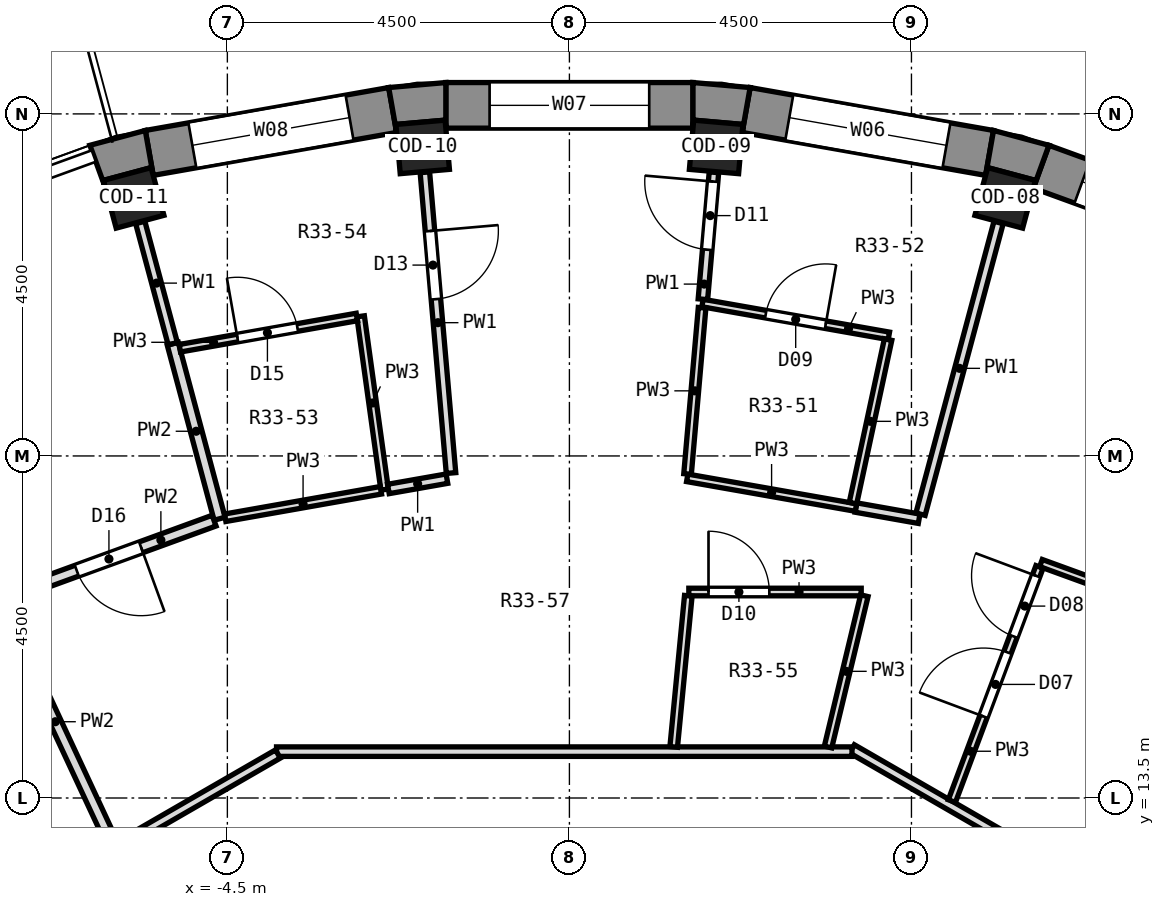
"""IFC4 building model, lengths in metres.
Left out: names, types, materials, properties, quantities, classifications, styles, units other than length and angle.
Written with IfcOpenShell. Run it as: python <this file> out.ifc"""

import sys

from ifc_helpers import new_model, si_unit, direction, frame, frame_2d, origin, origin_2d, place, context, subcontext, project, spatial, polyline, rectangle, outline, extrude, element, fill, save


model = new_model("IFC4")
c1 = context("Model", 3, precision=1e-05, world=origin(), true_north=direction((0.0, 1.0)))
c2 = subcontext(c1, "Body", "Model", "MODEL_VIEW")
j1 = project(units=[si_unit("LENGTHUNIT", "METRE"), si_unit("PLANEANGLEUNIT", "RADIAN")], contexts=[c1])
p1 = place(None, origin())
s1 = spatial("IfcSite", under=j1, at=p1, CompositionType="ELEMENT")
p2 = place(p1, origin())
s2 = spatial("IfcBuilding", under=s1, at=p2, CompositionType="ELEMENT")
p3 = place(p2, frame((0.0, 0.0, 229.7)))
s3 = spatial("IfcBuildingStorey", under=s2, at=p3, CompositionType="ELEMENT", Elevation=229.7)
for number, where, z_axis, x_axis in (
    (1, (5.733, 21.395, 0.0), (0.0, 0.0, 1.0), (0.259, 0.966, 0.0)),
    (2, (1.93, 22.066, 0.0), (0.0, 0.0, 1.0), (0.087, 0.996, 0.0)),
    (3, (-1.93, 22.066, 0.0), (0.0, 0.0, 1.0), (-0.087, 0.996, 0.0)),
    (4, (-5.733, 21.395, 0.0), (0.0, 0.0, 1.0), (-0.259, 0.966, 0.0)),
):
    element("IfcColumn", number, at=place(p3, frame(where, z_axis=z_axis, x_axis=x_axis)), inside=s3, PredefinedType="COLUMN", context=c2, shape_type="SweptSolid", body=[
        extrude(rectangle(XDim=0.65, YDim=0.65, at=origin_2d()), origin(), (0.0, 0.0, 1.0), 3.3),
    ])
p4 = place(p3, frame((9.262, 20.693, 0.0), z_axis=(0.0, 0.0, 1.0), x_axis=(-0.939679383794, 0.342056509473, 0.0)))
e5 = element("IfcWall", 5, at=p4, inside=s3, PredefinedType="SOLIDWALL", context=c2, shape_type="SweptSolid", body=[
    extrude(rectangle(XDim=3.252, YDim=0.6, at=frame_2d((1.626, 0.0))), origin(), (0.0, 0.0, 1.0), 2.9),
])
p5 = place(p4, frame((0.576, 0.0, 0.9)))
e6 = element("IfcOpeningElement", 6, at=p5, cuts=e5, PredefinedType="OPENING", context=c2, shape_type="SweptSolid", body=[
    extrude(rectangle(XDim=2.1, YDim=1.8, at=frame_2d((1.05, 0.9))), frame((0.0, 0.312, 0.0), z_axis=(0.0, -1.0, 0.0), x_axis=(1.0, 0.0, 0.0)), (0.0, 0.0, 1.0), 0.624),
])
p6 = place(p3, frame((5.528, 21.987, 0.0), z_axis=(0.0, 0.0, 1.0), x_axis=(-0.984806225186, 0.173656842178, 0.0)))
e7 = element("IfcWall", 7, at=p6, inside=s3, PredefinedType="SOLIDWALL", context=c2, shape_type="SweptSolid", body=[
    extrude(rectangle(XDim=3.252, YDim=0.6, at=frame_2d((1.626, 0.0))), origin(), (0.0, 0.0, 1.0), 2.9),
])
p7 = place(p6, frame((0.576, 0.0, 0.9)))
e8 = element("IfcOpeningElement", 8, at=p7, cuts=e7, PredefinedType="OPENING", context=c2, shape_type="SweptSolid", body=[
    extrude(rectangle(XDim=2.1, YDim=1.8, at=frame_2d((1.05, 0.9))), frame((0.0, 0.312, 0.0), z_axis=(0.0, -1.0, 0.0), x_axis=(1.0, 0.0, 0.0)), (0.0, 0.0, 1.0), 0.624),
])
p8 = place(p3, frame((1.626, 22.613, 0.0), z_axis=(0.0, 0.0, 1.0), x_axis=(-1.0, 0.0, 0.0)))
e9 = element("IfcWall", 9, at=p8, inside=s3, PredefinedType="SOLIDWALL", context=c2, shape_type="SweptSolid", body=[
    extrude(rectangle(XDim=3.251, YDim=0.6, at=frame_2d((1.626, 0.0))), origin(), (0.0, 0.0, 1.0), 2.9),
])
p9 = place(p8, frame((0.576, 0.0, 0.9)))
e10 = element("IfcOpeningElement", 10, at=p9, cuts=e9, PredefinedType="OPENING", context=c2, shape_type="SweptSolid", body=[
    extrude(rectangle(XDim=2.1, YDim=1.8, at=frame_2d((1.05, 0.9))), frame((0.0, 0.312, 0.0), z_axis=(0.0, -1.0, 0.0), x_axis=(1.0, 0.0, 0.0)), (0.0, 0.0, 1.0), 0.624),
])
p10 = place(p3, frame((-2.325, 22.551, 0.0), z_axis=(0.0, 0.0, 1.0), x_axis=(-0.984806225186, -0.173656842178, 0.0)))
e11 = element("IfcWall", 11, at=p10, inside=s3, PredefinedType="SOLIDWALL", context=c2, shape_type="SweptSolid", body=[
    extrude(rectangle(XDim=3.252, YDim=0.6, at=frame_2d((1.626, 0.0))), origin(), (0.0, 0.0, 1.0), 2.9),
])
p11 = place(p10, frame((0.576, 0.0, 0.9)))
e12 = element("IfcOpeningElement", 12, at=p11, cuts=e11, PredefinedType="OPENING", context=c2, shape_type="SweptSolid", body=[
    extrude(rectangle(XDim=2.1, YDim=1.8, at=frame_2d((1.05, 0.9))), frame((0.0, 0.312, 0.0), z_axis=(0.0, -1.0, 0.0), x_axis=(1.0, 0.0, 0.0)), (0.0, 0.0, 1.0), 0.624),
])
p12 = place(p3, origin())
e13 = element("IfcWall", 13, at=p12, inside=s3, PredefinedType="SOLIDWALL", context=c2, shape_type="SweptSolid", body=[
    extrude(outline(polyline([(5.58, 22.282), (5.476, 21.691), (5.503, 21.793), (6.131, 21.625), (6.104, 21.523), (6.309, 22.087), (5.58, 22.282)])), origin(), (0.0, 0.0, 1.0), 2.9),
])
p13 = place(p3, origin())
e14 = element("IfcWall", 14, at=p13, inside=s3, PredefinedType="SOLIDWALL", context=c2, shape_type="SweptSolid", body=[
    extrude(outline(polyline([(2.378, 22.847), (1.626, 22.913), (1.626, 22.312), (1.635, 22.418), (2.283, 22.361), (2.273, 22.256), (2.378, 22.847)])), origin(), (0.0, 0.0, 1.0), 2.9),
])
p14 = place(p3, origin())
e15 = element("IfcWall", 15, at=p14, inside=s3, PredefinedType="SOLIDWALL", context=c2, shape_type="SweptSolid", body=[
    extrude(outline(polyline([(-1.626, 22.913), (-2.378, 22.847), (-2.273, 22.256), (-2.283, 22.361), (-1.635, 22.418), (-1.626, 22.312), (-1.626, 22.913)])), origin(), (0.0, 0.0, 1.0), 2.9),
])
p15 = place(p3, origin())
e16 = element("IfcWall", 16, at=p15, inside=s3, PredefinedType="SOLIDWALL", context=c2, shape_type="SweptSolid", body=[
    extrude(outline(polyline([(-6.309, 22.087), (-6.104, 21.523), (-6.131, 21.625), (-5.503, 21.793), (-5.476, 21.691), (-5.58, 22.282), (-6.309, 22.087)])), origin(), (0.0, 0.0, 1.0), 2.9),
])
p16 = place(p3, frame((-1.902, 21.732, 0.0), z_axis=(0.0, 0.0, 1.0), x_axis=(0.086672056797, -0.996236896813, 0.0)))
e17 = element("IfcWall", 17, at=p16, inside=s3, PredefinedType="PARTITIONING", context=c2, shape_type="SweptSolid", body=[
    extrude(rectangle(XDim=3.972, YDim=0.125, at=frame_2d((1.986, 0.0))), origin(), (0.0, 0.0, 1.0), 2.9),
])
p17 = place(p16, frame((0.775, 0.0, 0.0)))
e18 = element("IfcOpeningElement", 18, at=p17, cuts=e17, PredefinedType="OPENING", context=c2, shape_type="SweptSolid", body=[
    extrude(rectangle(XDim=0.9, YDim=2.1, at=frame_2d((0.45, 1.05))), frame((0.0, 0.074, 0.0), z_axis=(0.0, -1.0, 0.0), x_axis=(1.0, 0.0, 0.0)), (0.0, 0.0, 1.0), 0.149),
])
p18 = place(p3, frame((-2.747, 19.837, 0.0), z_axis=(0.0, 0.0, 1.0), x_axis=(0.137351585164, -0.990522358179, 0.0)))
e19 = element("IfcWall", 19, at=p18, inside=s3, PredefinedType="PARTITIONING", context=c2, shape_type="SweptSolid", body=[
    extrude(rectangle(XDim=2.302, YDim=0.1, at=frame_2d((1.151, 0.0))), origin(), (0.0, 0.0, 1.0), 2.9),
])
p19 = place(p3, frame((-5.219, 19.477, 0.0), z_axis=(0.0, 0.0, 1.0), x_axis=(0.258503998493, -0.966010187712, 0.0)))
e20 = element("IfcWall", 20, at=p19, inside=s3, PredefinedType="PARTITIONING", context=c2, shape_type="SweptSolid", body=[
    extrude(rectangle(XDim=2.384, YDim=0.15, at=frame_2d((1.192, 0.0))), origin(), (0.0, 0.0, 1.0), 2.9),
])
p20 = place(p3, frame((-5.646, 21.072, 0.0), z_axis=(0.0, 0.0, 1.0), x_axis=(0.258849385643, -0.965917696055, 0.0)))
e21 = element("IfcWall", 21, at=p20, inside=s3, PredefinedType="PARTITIONING", context=c2, shape_type="SweptSolid", body=[
    extrude(rectangle(XDim=1.652, YDim=0.125, at=frame_2d((0.826, 0.0))), origin(), (0.0, 0.0, 1.0), 2.9),
])
p21 = place(p3, frame((-7.513, 16.112, 0.0), z_axis=(0.0, 0.0, 1.0), x_axis=(0.42248263036, -0.906371020634, 0.0)))
e22 = element("IfcWall", 22, at=p21, inside=s3, PredefinedType="PARTITIONING", context=c2, shape_type="SweptSolid", body=[
    extrude(rectangle(XDim=3.551, YDim=0.15, at=frame_2d((1.775, 0.0))), origin(), (0.0, 0.0, 1.0), 2.9),
])
p22 = place(p3, frame((3.718, 14.147, 0.0), z_axis=(0.0, 0.0, 1.0), x_axis=(0.866000791713, -0.500042626935, 0.0)))
e23 = element("IfcWall", 23, at=p22, inside=s3, PredefinedType="PARTITIONING", context=c2, shape_type="SweptSolid", body=[
    extrude(rectangle(XDim=7.635, YDim=0.125, at=frame_2d((3.817, 0.0))), origin(), (0.0, 0.0, 1.0), 2.9),
])
p23 = place(p22, frame((4.064, 0.0, 0.0)))
e24 = element("IfcOpeningElement", 24, at=p23, cuts=e23, PredefinedType="OPENING", context=c2, shape_type="SweptSolid", body=[
    extrude(rectangle(XDim=1.0, YDim=2.1, at=frame_2d((0.5, 1.05))), frame((0.0, 0.074, 0.0), z_axis=(0.0, -1.0, 0.0), x_axis=(1.0, 0.0, 0.0)), (0.0, 0.0, 1.0), 0.149),
])
p24 = place(p3, frame((6.204, 16.591, 0.0), z_axis=(0.0, 0.0, 1.0), x_axis=(0.939623600186, -0.342209716364, 0.0)))
e25 = element("IfcWall", 25, at=p24, inside=s3, PredefinedType="PARTITIONING", context=c2, shape_type="SweptSolid", body=[
    extrude(rectangle(XDim=1.344, YDim=0.1, at=frame_2d((0.672, 0.0))), origin(), (0.0, 0.0, 1.0), 2.9),
])
p25 = place(p3, frame((3.769, 17.321, 0.0), z_axis=(0.0, 0.0, 1.0), x_axis=(0.984637698915, -0.174609856179, 0.0)))
e26 = element("IfcWall", 26, at=p25, inside=s3, PredefinedType="PARTITIONING", context=c2, shape_type="SweptSolid", body=[
    extrude(rectangle(XDim=0.844, YDim=0.125, at=frame_2d((0.422, 0.0))), origin(), (0.0, 0.0, 1.0), 2.9),
])
p26 = place(p3, frame((1.55, 17.712, 0.0), z_axis=(0.0, 0.0, 1.0), x_axis=(0.984859814572, -0.173352662631, 0.0)))
e27 = element("IfcWall", 27, at=p26, inside=s3, PredefinedType="PARTITIONING", context=c2, shape_type="SweptSolid", body=[
    extrude(rectangle(XDim=2.253, YDim=0.1, at=frame_2d((1.127, 0.0))), origin(), (0.0, 0.0, 1.0), 2.9),
])
p27 = place(p3, frame((1.751, 20.012, 0.0), z_axis=(0.0, 0.0, 1.0), x_axis=(0.984838792384, -0.173472052547, 0.0)))
e28 = element("IfcWall", 28, at=p27, inside=s3, PredefinedType="PARTITIONING", context=c2, shape_type="SweptSolid", body=[
    extrude(rectangle(XDim=2.49, YDim=0.1, at=frame_2d((1.245, 0.0))), origin(), (0.0, 0.0, 1.0), 2.9),
])
p28 = place(p27, frame((0.845, 0.0, 0.0)))
e29 = element("IfcOpeningElement", 29, at=p28, cuts=e28, PredefinedType="OPENING", context=c2, shape_type="SweptSolid", body=[
    extrude(rectangle(XDim=0.8, YDim=2.1, at=frame_2d((0.4, 1.05))), frame((0.0, 0.062, 0.0), z_axis=(0.0, -1.0, 0.0), x_axis=(1.0, 0.0, 0.0)), (0.0, 0.0, 1.0), 0.124),
])
p29 = place(p3, frame((-3.853, 14.11, 0.0), z_axis=(0.0, 0.0, 1.0), x_axis=(1.0, 0.0, 0.0)))
e30 = element("IfcWall", 30, at=p29, inside=s3, PredefinedType="PARTITIONING", context=c2, shape_type="SweptSolid", body=[
    extrude(rectangle(XDim=7.571, YDim=0.125, at=frame_2d((3.785, 0.0))), origin(), (0.0, 0.0, 1.0), 2.9),
])
p30 = place(p3, frame((1.571, 16.21, 0.0), z_axis=(0.0, 0.0, 1.0), x_axis=(1.0, 0.0, 0.0)))
e31 = element("IfcWall", 31, at=p30, inside=s3, PredefinedType="PARTITIONING", context=c2, shape_type="SweptSolid", body=[
    extrude(rectangle(XDim=2.268, YDim=0.1, at=frame_2d((1.134, 0.0))), origin(), (0.0, 0.0, 1.0), 2.9),
])
p31 = place(p30, frame((0.259, 0.0, 0.0)))
e32 = element("IfcOpeningElement", 32, at=p31, cuts=e31, PredefinedType="OPENING", context=c2, shape_type="SweptSolid", body=[
    extrude(rectangle(XDim=0.8, YDim=2.1, at=frame_2d((0.4, 1.05))), frame((0.0, 0.062, 0.0), z_axis=(0.0, -1.0, 0.0), x_axis=(1.0, 0.0, 0.0)), (0.0, 0.0, 1.0), 0.124),
])
p32 = place(p3, frame((-4.528, 17.187, 0.0), z_axis=(0.0, 0.0, 1.0), x_axis=(0.984788286148, 0.173758543574, 0.0)))
e33 = element("IfcWall", 33, at=p32, inside=s3, PredefinedType="PARTITIONING", context=c2, shape_type="SweptSolid", body=[
    extrude(rectangle(XDim=2.08, YDim=0.1, at=frame_2d((1.04, 0.0))), origin(), (0.0, 0.0, 1.0), 2.9),
])
p33 = place(p3, frame((-2.382, 17.566, 0.0), z_axis=(0.0, 0.0, 1.0), x_axis=(0.984877691651, 0.173251067786, 0.0)))
e34 = element("IfcWall", 34, at=p33, inside=s3, PredefinedType="PARTITIONING", context=c2, shape_type="SweptSolid", body=[
    extrude(rectangle(XDim=0.782, YDim=0.125, at=frame_2d((0.391, 0.0))), origin(), (0.0, 0.0, 1.0), 2.9),
])
p34 = place(p3, frame((-5.125, 19.417, 0.0), z_axis=(0.0, 0.0, 1.0), x_axis=(0.984757568604, 0.173932547494, 0.0)))
e35 = element("IfcWall", 35, at=p34, inside=s3, PredefinedType="PARTITIONING", context=c2, shape_type="SweptSolid", body=[
    extrude(rectangle(XDim=2.365, YDim=0.1, at=frame_2d((1.183, 0.0))), origin(), (0.0, 0.0, 1.0), 2.9),
])
p35 = place(p34, frame((0.77, 0.0, 0.0)))
e36 = element("IfcOpeningElement", 36, at=p35, cuts=e35, PredefinedType="OPENING", context=c2, shape_type="SweptSolid", body=[
    extrude(rectangle(XDim=0.8, YDim=2.1, at=frame_2d((0.4, 1.05))), frame((0.0, 0.062, 0.0), z_axis=(0.0, -1.0, 0.0), x_axis=(1.0, 0.0, 0.0)), (0.0, 0.0, 1.0), 0.124),
])
p36 = place(p3, frame((-7.442, 16.14, 0.0), z_axis=(0.0, 0.0, 1.0), x_axis=(0.939459000347, 0.342661329401, 0.0)))
e37 = element("IfcWall", 37, at=p36, inside=s3, PredefinedType="PARTITIONING", context=c2, shape_type="SweptSolid", body=[
    extrude(rectangle(XDim=2.945, YDim=0.15, at=frame_2d((1.473, 0.0))), origin(), (0.0, 0.0, 1.0), 2.9),
])
p37 = place(p36, frame((1.023, 0.0, 0.0)))
e38 = element("IfcOpeningElement", 38, at=p37, cuts=e37, PredefinedType="OPENING", context=c2, shape_type="SweptSolid", body=[
    extrude(rectangle(XDim=0.9, YDim=2.1, at=frame_2d((0.45, 1.05))), frame((0.0, 0.087, 0.0), z_axis=(0.0, -1.0, 0.0), x_axis=(1.0, 0.0, 0.0)), (0.0, 0.0, 1.0), 0.174),
])
p38 = place(p3, frame((-10.275, 10.36, 0.0), z_axis=(0.0, 0.0, 1.0), x_axis=(0.865993671729, 0.500054957505, 0.0)))
e39 = element("IfcWall", 39, at=p38, inside=s3, PredefinedType="PARTITIONING", context=c2, shape_type="SweptSolid", body=[
    extrude(rectangle(XDim=7.436, YDim=0.125, at=frame_2d((3.718, 0.0))), origin(), (0.0, 0.0, 1.0), 2.9),
])
p39 = place(p38, frame((0.728, 0.0, 0.0)))
e40 = element("IfcOpeningElement", 40, at=p39, cuts=e39, PredefinedType="OPENING", context=c2, shape_type="SweptSolid", body=[
    extrude(rectangle(XDim=0.9, YDim=2.1, at=frame_2d((0.45, 1.05))), frame((0.0, 0.074, 0.0), z_axis=(0.0, -1.0, 0.0), x_axis=(1.0, 0.0, 0.0)), (0.0, 0.0, 1.0), 0.149),
])
p40 = place(p3, frame((5.032, 13.459, 0.0), z_axis=(0.0, 0.0, 1.0), x_axis=(0.350375066682, 0.936609477129, 0.0)))
e41 = element("IfcWall", 41, at=p40, inside=s3, PredefinedType="PARTITIONING", context=c2, shape_type="SweptSolid", body=[
    extrude(rectangle(XDim=3.29, YDim=0.1, at=frame_2d((1.645, 0.0))), origin(), (0.0, 0.0, 1.0), 2.9),
])
p41 = place(p40, frame((1.189, 0.0, 0.0)))
e42 = element("IfcOpeningElement", 42, at=p41, cuts=e41, PredefinedType="OPENING", context=c2, shape_type="SweptSolid", body=[
    extrude(rectangle(XDim=0.9, YDim=2.1, at=frame_2d((0.45, 1.05))), frame((0.0, 0.062, 0.0), z_axis=(0.0, -1.0, 0.0), x_axis=(1.0, 0.0, 0.0)), (0.0, 0.0, 1.0), 0.124),
])
p42 = place(p40, frame((2.314, 0.0, 0.0)))
e43 = element("IfcOpeningElement", 43, at=p42, cuts=e41, PredefinedType="OPENING", context=c2, shape_type="SweptSolid", body=[
    extrude(rectangle(XDim=0.85, YDim=2.1, at=frame_2d((0.425, 1.05))), frame((0.0, 0.062, 0.0), z_axis=(0.0, -1.0, 0.0), x_axis=(1.0, 0.0, 0.0)), (0.0, 0.0, 1.0), 0.124),
])
p43 = place(p3, frame((4.619, 17.234, 0.0), z_axis=(0.0, 0.0, 1.0), x_axis=(0.258553809463, 0.965996856937, 0.0)))
e44 = element("IfcWall", 44, at=p43, inside=s3, PredefinedType="PARTITIONING", context=c2, shape_type="SweptSolid", body=[
    extrude(rectangle(XDim=3.972, YDim=0.125, at=frame_2d((1.986, 0.0))), origin(), (0.0, 0.0, 1.0), 2.9),
])
p44 = place(p3, frame((3.403, 14.171, 0.0), z_axis=(0.0, 0.0, 1.0), x_axis=(0.233377462785, 0.972386219495, 0.0)))
e45 = element("IfcWall", 45, at=p44, inside=s3, PredefinedType="PARTITIONING", context=c2, shape_type="SweptSolid", body=[
    extrude(rectangle(XDim=2.047, YDim=0.1, at=frame_2d((1.024, 0.0))), origin(), (0.0, 0.0, 1.0), 2.9),
])
p45 = place(p3, frame((3.73, 17.379, 0.0), z_axis=(0.0, 0.0, 1.0), x_axis=(0.209960822615, 0.977709799975, 0.0)))
e46 = element("IfcWall", 46, at=p45, inside=s3, PredefinedType="PARTITIONING", context=c2, shape_type="SweptSolid", body=[
    extrude(rectangle(XDim=2.201, YDim=0.1, at=frame_2d((1.101, 0.0))), origin(), (0.0, 0.0, 1.0), 2.9),
])
p46 = place(p3, frame((1.372, 14.172, 0.0), z_axis=(0.0, 0.0, 1.0), x_axis=(0.096199186447, 0.99536210322, 0.0)))
e47 = element("IfcWall", 47, at=p46, inside=s3, PredefinedType="PARTITIONING", context=c2, shape_type="SweptSolid", body=[
    extrude(rectangle(XDim=1.997, YDim=0.1, at=frame_2d((0.999, 0.0))), origin(), (0.0, 0.0, 1.0), 2.9),
])
p47 = place(p3, frame((1.756, 20.062, 0.0), z_axis=(0.0, 0.0, 1.0), x_axis=(0.086648468713, 0.996238948681, 0.0)))
e48 = element("IfcWall", 48, at=p47, inside=s3, PredefinedType="PARTITIONING", context=c2, shape_type="SweptSolid", body=[
    extrude(rectangle(XDim=1.677, YDim=0.125, at=frame_2d((0.838, 0.0))), origin(), (0.0, 0.0, 1.0), 2.9),
])
p48 = place(p47, frame((0.654, 0.0, 0.0)))
e49 = element("IfcOpeningElement", 49, at=p48, cuts=e48, PredefinedType="OPENING", context=c2, shape_type="SweptSolid", body=[
    extrude(rectangle(XDim=0.9, YDim=2.1, at=frame_2d((0.45, 1.05))), frame((0.0, 0.074, 0.0), z_axis=(0.0, -1.0, 0.0), x_axis=(1.0, 0.0, 0.0)), (0.0, 0.0, 1.0), 0.149),
])
p49 = place(p3, frame((1.554, 17.763, 0.0), z_axis=(0.0, 0.0, 1.0), x_axis=(0.087075900377, 0.99620168017, 0.0)))
e50 = element("IfcWall", 50, at=p49, inside=s3, PredefinedType="PARTITIONING", context=c2, shape_type="SweptSolid", body=[
    extrude(rectangle(XDim=2.195, YDim=0.1, at=frame_2d((1.098, 0.0))), origin(), (0.0, 0.0, 1.0), 2.9),
])
p50 = place(p5, origin())
e51 = element("IfcWindow", 51, at=p50, inside=s3, PartitioningType="SINGLE_PANEL", PredefinedType="WINDOW", context=c2, shape_type="SweptSolid", body=[
    extrude(rectangle(XDim=2.1, YDim=1.8, at=frame_2d((1.05, 0.9))), frame((0.0, 0.18, 0.0), z_axis=(0.0, -1.0, 0.0), x_axis=(1.0, 0.0, 0.0)), (0.0, 0.0, 1.0), 0.06),
])
fill(e6, e51)
p51 = place(p7, origin())
e52 = element("IfcWindow", 52, at=p51, inside=s3, PartitioningType="SINGLE_PANEL", PredefinedType="WINDOW", context=c2, shape_type="SweptSolid", body=[
    extrude(rectangle(XDim=2.1, YDim=1.8, at=frame_2d((1.05, 0.9))), frame((0.0, 0.18, 0.0), z_axis=(0.0, -1.0, 0.0), x_axis=(1.0, 0.0, 0.0)), (0.0, 0.0, 1.0), 0.06),
])
fill(e8, e52)
p52 = place(p9, origin())
e53 = element("IfcWindow", 53, at=p52, inside=s3, PartitioningType="SINGLE_PANEL", PredefinedType="WINDOW", context=c2, shape_type="SweptSolid", body=[
    extrude(rectangle(XDim=2.1, YDim=1.8, at=frame_2d((1.05, 0.9))), frame((0.0, 0.18, 0.0), z_axis=(0.0, -1.0, 0.0), x_axis=(1.0, 0.0, 0.0)), (0.0, 0.0, 1.0), 0.06),
])
fill(e10, e53)
p53 = place(p11, origin())
e54 = element("IfcWindow", 54, at=p53, inside=s3, PartitioningType="SINGLE_PANEL", PredefinedType="WINDOW", context=c2, shape_type="SweptSolid", body=[
    extrude(rectangle(XDim=2.1, YDim=1.8, at=frame_2d((1.05, 0.9))), frame((0.0, 0.18, 0.0), z_axis=(0.0, -1.0, 0.0), x_axis=(1.0, 0.0, 0.0)), (0.0, 0.0, 1.0), 0.06),
])
fill(e12, e54)
p54 = place(p41, origin())
e55 = element("IfcDoor", 55, at=p54, inside=s3, OperationType="SINGLE_SWING_LEFT", PredefinedType="DOOR", context=c2, shape_type="SweptSolid", body=[
    extrude(rectangle(XDim=0.9, YDim=2.1, at=frame_2d((0.45, 1.05))), frame((0.0, 0.025, 0.0), z_axis=(0.0, -1.0, 0.0), x_axis=(1.0, 0.0, 0.0)), (0.0, 0.0, 1.0), 0.05),
])
fill(e42, e55)
p55 = place(p42, origin())
e56 = element("IfcDoor", 56, at=p55, inside=s3, OperationType="SINGLE_SWING_RIGHT", PredefinedType="DOOR", context=c2, shape_type="SweptSolid", body=[
    extrude(rectangle(XDim=0.85, YDim=2.1, at=frame_2d((0.425, 1.05))), frame((0.0, 0.025, 0.0), z_axis=(0.0, -1.0, 0.0), x_axis=(1.0, 0.0, 0.0)), (0.0, 0.0, 1.0), 0.05),
])
fill(e43, e56)
p56 = place(p28, origin())
e57 = element("IfcDoor", 57, at=p56, inside=s3, OperationType="SINGLE_SWING_RIGHT", PredefinedType="DOOR", context=c2, shape_type="SweptSolid", body=[
    extrude(rectangle(XDim=0.8, YDim=2.1, at=frame_2d((0.4, 1.05))), frame((0.0, 0.025, 0.0), z_axis=(0.0, -1.0, 0.0), x_axis=(1.0, 0.0, 0.0)), (0.0, 0.0, 1.0), 0.05),
])
fill(e29, e57)
p57 = place(p31, origin())
e58 = element("IfcDoor", 58, at=p57, inside=s3, OperationType="SINGLE_SWING_LEFT", PredefinedType="DOOR", context=c2, shape_type="SweptSolid", body=[
    extrude(rectangle(XDim=0.8, YDim=2.1, at=frame_2d((0.4, 1.05))), frame((0.0, 0.025, 0.0), z_axis=(0.0, -1.0, 0.0), x_axis=(1.0, 0.0, 0.0)), (0.0, 0.0, 1.0), 0.05),
])
fill(e32, e58)
p58 = place(p48, origin())
e59 = element("IfcDoor", 59, at=p58, inside=s3, OperationType="SINGLE_SWING_RIGHT", PredefinedType="DOOR", context=c2, shape_type="SweptSolid", body=[
    extrude(rectangle(XDim=0.9, YDim=2.1, at=frame_2d((0.45, 1.05))), frame((0.0, 0.025, 0.0), z_axis=(0.0, -1.0, 0.0), x_axis=(1.0, 0.0, 0.0)), (0.0, 0.0, 1.0), 0.05),
])
fill(e49, e59)
p59 = place(p17, origin())
e60 = element("IfcDoor", 60, at=p59, inside=s3, OperationType="SINGLE_SWING_LEFT", PredefinedType="DOOR", context=c2, shape_type="SweptSolid", body=[
    extrude(rectangle(XDim=0.9, YDim=2.1, at=frame_2d((0.45, 1.05))), frame((0.0, 0.025, 0.0), z_axis=(0.0, -1.0, 0.0), x_axis=(1.0, 0.0, 0.0)), (0.0, 0.0, 1.0), 0.05),
])
fill(e18, e60)
p60 = place(p35, origin())
e61 = element("IfcDoor", 61, at=p60, inside=s3, OperationType="SINGLE_SWING_LEFT", PredefinedType="DOOR", context=c2, shape_type="SweptSolid", body=[
    extrude(rectangle(XDim=0.8, YDim=2.1, at=frame_2d((0.4, 1.05))), frame((0.0, 0.025, 0.0), z_axis=(0.0, -1.0, 0.0), x_axis=(1.0, 0.0, 0.0)), (0.0, 0.0, 1.0), 0.05),
])
fill(e36, e61)
p61 = place(p37, frame((0.9, 0.0, 0.0), z_axis=(0.0, 0.0, 1.0), x_axis=(-1.0, 0.0, 0.0)))
e62 = element("IfcDoor", 62, at=p61, inside=s3, OperationType="SINGLE_SWING_LEFT", PredefinedType="DOOR", context=c2, shape_type="SweptSolid", body=[
    extrude(rectangle(XDim=0.9, YDim=2.1, at=frame_2d((0.45, 1.05))), frame((0.0, 0.025, 0.0), z_axis=(0.0, -1.0, 0.0), x_axis=(1.0, 0.0, 0.0)), (0.0, 0.0, 1.0), 0.05),
])
fill(e38, e62)
save(model, sys.argv[1])
